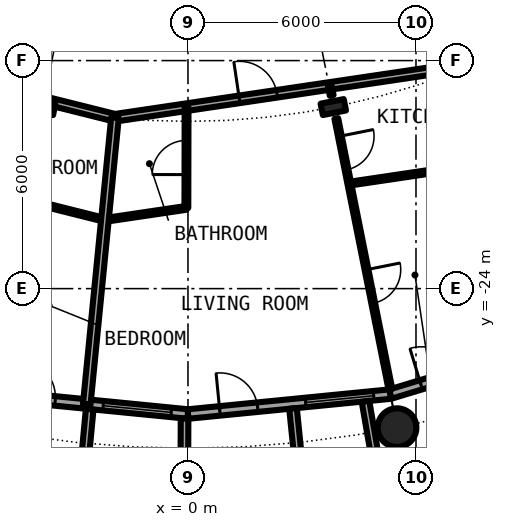
"""IFC4 building model, lengths in metres.
Left out: names, types, materials, properties, quantities, classifications, styles, units other than length and angle.
Written with IfcOpenShell. Run it as: python <this file> out.ifc"""

import sys

from ifc_helpers import new_model, si_unit, direction, frame, frame_2d, origin, origin_2d, place, context, subcontext, project, spatial, rectangle, hollow_circle, i_section, extrude, element, fill, save


model = new_model("IFC4")
c1 = context("Model", 3, precision=1e-05, world=origin(), true_north=direction((0.0, 1.0)))
c2 = subcontext(c1, "Body", "Model", "MODEL_VIEW")
j1 = project(units=[si_unit("LENGTHUNIT", "METRE"), si_unit("PLANEANGLEUNIT", "RADIAN")], contexts=[c1])
p1 = place(None, origin())
s1 = spatial("IfcSite", under=j1, at=p1, CompositionType="ELEMENT")
p2 = place(p1, origin())
s2 = spatial("IfcBuilding", under=s1, at=p2, CompositionType="ELEMENT")
p3 = place(p2, frame((0.0, 0.0, 35.0)))
s3 = spatial("IfcBuildingStorey", under=s2, at=p3, CompositionType="ELEMENT", Elevation=35.0)
p4 = place(p3, frame((5.501, -27.658, 0.0), z_axis=(0.0, 0.0, 1.0), x_axis=(1.0, 0.0, 0.0)))
e1 = element("IfcColumn", 1, at=p4, inside=s3, PredefinedType="COLUMN", context=c2, shape_type="SweptSolid", body=[
    extrude(hollow_circle(Radius=0.508, WallThickness=0.05, at=origin_2d()), origin(), (0.0, 0.0, 1.0), 3.05),
])
for number, where, z_axis, x_axis in (
    (2, (-3.824, -19.223, 0.0), (0.0, 0.0, 1.0), (-0.195, -0.981, 0.0)),
    (3, (3.824, -19.223, 0.0), (0.0, 0.0, 1.0), (0.195, -0.981, 0.0)),
):
    element("IfcColumn", number, at=place(p3, frame(where, z_axis=z_axis, x_axis=x_axis)), inside=s3, PredefinedType="COLUMN", context=c2, shape_type="SweptSolid", body=[
        extrude(i_section(OverallWidth=0.305, OverallDepth=0.62, WebThickness=0.021, FlangeThickness=0.04, FilletRadius=0.027, at=origin_2d()), origin(), (0.0, 0.0, 1.0), 3.05),
    ])
p5 = place(p3, frame((-5.326, -26.775, 0.0), z_axis=(0.0, 0.0, 1.0), x_axis=(0.995173996315, -0.098126026407, 0.0)))
e4 = element("IfcWall", 4, at=p5, inside=s3, PredefinedType="SOLIDWALL", context=c2, shape_type="SweptSolid", body=[
    extrude(rectangle(XDim=5.352, YDim=0.25, at=frame_2d((2.676, 0.0))), origin(), (0.0, 0.0, 1.0), 2.7),
])
p6 = place(p5, frame((0.841, 0.0, 0.0)))
e5 = element("IfcOpeningElement", 5, at=p6, cuts=e4, PredefinedType="OPENING", context=c2, shape_type="SweptSolid", body=[
    extrude(rectangle(XDim=1.0, YDim=2.2, at=frame_2d((0.5, 1.1))), frame((0.0, 0.135, 0.0), z_axis=(0.0, -1.0, 0.0), x_axis=(1.0, 0.0, 0.0)), (0.0, 0.0, 1.0), 0.27),
])
p7 = place(p5, frame((3.111, 0.0, 0.3)))
e6 = element("IfcOpeningElement", 6, at=p7, cuts=e4, PredefinedType="OPENING", context=c2, shape_type="SweptSolid", body=[
    extrude(rectangle(XDim=1.8, YDim=2.1, at=frame_2d((0.9, 1.05))), frame((0.0, 0.135, 0.0), z_axis=(0.0, -1.0, 0.0), x_axis=(1.0, 0.0, 0.0)), (0.0, 0.0, 1.0), 0.27),
])
p8 = place(p3, frame((-2.586, -27.171, -0.03), z_axis=(0.0, 0.0, 1.0), x_axis=(-0.094548432284, -0.995520262954, 0.0)))
e7 = element("IfcWall", 7, at=p8, inside=s3, PredefinedType="SOLIDWALL", context=c2, shape_type="SweptSolid", body=[
    extrude(rectangle(XDim=3.006, YDim=0.2, at=frame_2d((1.503, 0.0))), origin(), (0.0, 0.0, 1.0), 2.73),
])
p9 = place(p3, frame((-0.09, -27.417, -0.03), z_axis=(0.0, 0.0, 1.0), x_axis=(-0.00347308367, -0.999993968827, 0.0)))
e8 = element("IfcWall", 8, at=p9, inside=s3, PredefinedType="SOLIDWALL", context=c2, shape_type="SweptSolid", body=[
    extrude(rectangle(XDim=2.882, YDim=0.2, at=frame_2d((1.441, 0.0))), origin(), (0.0, 0.0, 1.0), 2.73),
])
p10 = place(p3, frame((0.0, -27.3, 0.0), z_axis=(0.0, 0.0, 1.0), x_axis=(0.995173996315, 0.098126026407, 0.0)))
e9 = element("IfcWall", 9, at=p10, inside=s3, PredefinedType="SOLIDWALL", context=c2, shape_type="SweptSolid", body=[
    extrude(rectangle(XDim=5.352, YDim=0.25, at=frame_2d((2.676, 0.0))), origin(), (0.0, 0.0, 1.0), 2.7),
])
p11 = place(p10, frame((0.841, 0.0, 0.0)))
e10 = element("IfcOpeningElement", 10, at=p11, cuts=e9, PredefinedType="OPENING", context=c2, shape_type="SweptSolid", body=[
    extrude(rectangle(XDim=1.0, YDim=2.2, at=frame_2d((0.5, 1.1))), frame((0.0, 0.135, 0.0), z_axis=(0.0, -1.0, 0.0), x_axis=(1.0, 0.0, 0.0)), (0.0, 0.0, 1.0), 0.27),
])
p12 = place(p10, frame((3.111, 0.0, 0.3)))
e11 = element("IfcOpeningElement", 11, at=p12, cuts=e9, PredefinedType="OPENING", context=c2, shape_type="SweptSolid", body=[
    extrude(rectangle(XDim=1.8, YDim=2.1, at=frame_2d((0.9, 1.05))), frame((0.0, 0.135, 0.0), z_axis=(0.0, -1.0, 0.0), x_axis=(1.0, 0.0, 0.0)), (0.0, 0.0, 1.0), 0.27),
])
p13 = place(p3, frame((2.764, -27.153, -0.03), z_axis=(0.0, 0.0, 1.0), x_axis=(0.101505487237, -0.994834979311, 0.0)))
e12 = element("IfcWall", 12, at=p13, inside=s3, PredefinedType="SOLIDWALL", context=c2, shape_type="SweptSolid", body=[
    extrude(rectangle(XDim=3.007, YDim=0.2, at=frame_2d((1.503, 0.0))), origin(), (0.0, 0.0, 1.0), 2.73),
])
p14 = place(p3, frame((4.671, -26.966, -0.03), z_axis=(0.0, 0.0, 1.0), x_axis=(0.170539878907, -0.985350774954, 0.0)))
e13 = element("IfcWall", 13, at=p14, inside=s3, PredefinedType="SOLIDWALL", context=c2, shape_type="SweptSolid", body=[
    extrude(rectangle(XDim=2.932, YDim=0.2, at=frame_2d((1.466, 0.0))), origin(), (0.0, 0.0, 1.0), 2.73),
])
p15 = place(p3, frame((5.326, -26.775, 0.0), z_axis=(0.0, 0.0, 1.0), x_axis=(0.956965678721, 0.290201119486, 0.0)))
e14 = element("IfcWall", 14, at=p15, inside=s3, PredefinedType="SOLIDWALL", context=c2, shape_type="SweptSolid", body=[
    extrude(rectangle(XDim=5.351, YDim=0.25, at=frame_2d((2.676, 0.0))), origin(), (0.0, 0.0, 1.0), 2.7),
])
p16 = place(p15, frame((0.841, 0.0, 0.0)))
e15 = element("IfcOpeningElement", 15, at=p16, cuts=e14, PredefinedType="OPENING", context=c2, shape_type="SweptSolid", body=[
    extrude(rectangle(XDim=1.0, YDim=2.2, at=frame_2d((0.5, 1.1))), frame((0.0, 0.135, 0.0), z_axis=(0.0, -1.0, 0.0), x_axis=(1.0, 0.0, 0.0)), (0.0, 0.0, 1.0), 0.27),
])
p17 = place(p15, frame((3.111, 0.0, 0.3)))
e16 = element("IfcOpeningElement", 16, at=p17, cuts=e14, PredefinedType="OPENING", context=c2, shape_type="SweptSolid", body=[
    extrude(rectangle(XDim=1.8, YDim=2.1, at=frame_2d((0.9, 1.05))), frame((0.0, 0.135, 0.0), z_axis=(0.0, -1.0, 0.0), x_axis=(1.0, 0.0, 0.0)), (0.0, 0.0, 1.0), 0.27),
])
p18 = place(p3, frame((-4.302, -21.663, 0.0), z_axis=(0.0, 0.0, 1.0), x_axis=(0.97003047456, -0.242983288366, 0.0)))
e17 = element("IfcWall", 17, at=p18, inside=s3, PredefinedType="PARTITIONING", context=c2, shape_type="SweptSolid", body=[
    extrude(rectangle(XDim=2.181, YDim=0.1, at=frame_2d((1.091, 0.0))), origin(), (0.0, 0.0, 1.0), 2.7),
])
p19 = place(p3, frame((-2.186, -22.193, 0.0), z_axis=(0.0, 0.0, 1.0), x_axis=(0.989171386505, 0.146765009863, 0.0)))
e18 = element("IfcWall", 18, at=p19, inside=s3, PredefinedType="PARTITIONING", context=c2, shape_type="SweptSolid", body=[
    extrude(rectangle(XDim=2.167, YDim=0.1, at=frame_2d((1.084, 0.0))), origin(), (0.0, 0.0, 1.0), 2.7),
])
p20 = place(p3, frame((4.246, -21.239, 0.0), z_axis=(0.0, 0.0, 1.0), x_axis=(0.989178348771, 0.146718077695, 0.0)))
e19 = element("IfcWall", 19, at=p20, inside=s3, PredefinedType="PARTITIONING", context=c2, shape_type="SweptSolid", body=[
    extrude(rectangle(XDim=4.335, YDim=0.1, at=frame_2d((2.167, 0.0))), origin(), (0.0, 0.0, 1.0), 2.7),
])
p21 = place(p3, frame((-3.639, -19.076, 0.0), z_axis=(0.0, 0.0, 1.0), x_axis=(0.970053237222, -0.242892397895, 0.0)))
e20 = element("IfcWall", 20, at=p21, inside=s3, PredefinedType="PARTITIONING", context=c2, shape_type="SweptSolid", body=[
    extrude(rectangle(XDim=1.771, YDim=0.2, at=frame_2d((0.885, 0.0))), origin(), (0.0, 0.0, 1.0), 2.38),
])
p22 = place(p3, frame((-1.927, -19.506, 0.0), z_axis=(0.0, 0.0, 1.0), x_axis=(0.989181308547, 0.146698121399, 0.0)))
e21 = element("IfcWall", 21, at=p22, inside=s3, PredefinedType="PARTITIONING", context=c2, shape_type="SweptSolid", body=[
    extrude(rectangle(XDim=9.531, YDim=0.2, at=frame_2d((4.766, 0.0))), origin(), (0.0, 0.0, 1.0), 2.38),
])
p23 = place(p22, frame((3.316, 0.0, 0.0)))
e22 = element("IfcOpeningElement", 22, at=p23, cuts=e21, PredefinedType="OPENING", context=c2, shape_type="SweptSolid", body=[
    extrude(rectangle(XDim=1.0, YDim=2.3, at=frame_2d((0.5, 1.15))), frame((0.0, 0.11, 0.0), z_axis=(0.0, -1.0, 0.0), x_axis=(1.0, 0.0, 0.0)), (0.0, 0.0, 1.0), 0.22),
])
p24 = place(p3, frame((-2.664, -27.044, 0.0), z_axis=(0.0, 0.0, 1.0), x_axis=(0.098115395479, 0.995175044487, 0.0)))
e23 = element("IfcWall", 23, at=p24, inside=s3, PredefinedType="PARTITIONING", context=c2, shape_type="SweptSolid", body=[
    extrude(rectangle(XDim=7.574, YDim=0.2, at=frame_2d((3.787, 0.0))), origin(), (0.0, 0.0, 1.0), 2.7),
])
p25 = place(p3, frame((-0.042, -21.875, 0.0), z_axis=(0.0, 0.0, 1.0), x_axis=(0.001843314841, 0.999998301094, 0.0)))
e24 = element("IfcWall", 24, at=p25, inside=s3, PredefinedType="PARTITIONING", context=c2, shape_type="SweptSolid", body=[
    extrude(rectangle(XDim=2.649, YDim=0.1, at=frame_2d((1.324, 0.0))), origin(), (0.0, 0.0, 1.0), 2.7),
])
p26 = place(p25, frame((0.875, 0.0, 0.0)))
e25 = element("IfcOpeningElement", 25, at=p26, cuts=e24, PredefinedType="OPENING", context=c2, shape_type="SweptSolid", body=[
    extrude(rectangle(XDim=0.9, YDim=2.3, at=frame_2d((0.45, 1.15))), frame((0.0, 0.06, 0.0), z_axis=(0.0, -1.0, 0.0), x_axis=(1.0, 0.0, 0.0)), (0.0, 0.0, 1.0), 0.12),
])
p27 = place(p3, frame((3.732, -18.667, 0.0), z_axis=(0.0, 0.0, 1.0), x_axis=(0.197040251839, -0.980395399395, 0.0)))
e26 = element("IfcWall", 26, at=p27, inside=s3, PredefinedType="PARTITIONING", context=c2, shape_type="SweptSolid", body=[
    extrude(rectangle(XDim=0.254, YDim=0.1, at=frame_2d((0.127, 0.0))), origin(), (0.0, 0.0, 1.0), 2.7),
])
p28 = place(p3, frame((3.903, -19.524, 0.0), z_axis=(0.0, 0.0, 1.0), x_axis=(0.195986881771, -0.980606517505, 0.0)))
e27 = element("IfcWall", 27, at=p28, inside=s3, PredefinedType="PARTITIONING", context=c2, shape_type="SweptSolid", body=[
    extrude(rectangle(XDim=7.265, YDim=0.1, at=frame_2d((3.632, 0.0))), origin(), (0.0, 0.0, 1.0), 2.7),
])
p29 = place(p28, frame((0.476, 0.0, 0.0)))
e28 = element("IfcOpeningElement", 28, at=p29, cuts=e27, PredefinedType="OPENING", context=c2, shape_type="SweptSolid", body=[
    extrude(rectangle(XDim=0.9, YDim=2.3, at=frame_2d((0.45, 1.15))), frame((0.0, 0.06, 0.0), z_axis=(0.0, -1.0, 0.0), x_axis=(1.0, 0.0, 0.0)), (0.0, 0.0, 1.0), 0.12),
])
p30 = place(p28, frame((4.057, 0.0, 0.0)))
e29 = element("IfcOpeningElement", 29, at=p30, cuts=e27, PredefinedType="OPENING", context=c2, shape_type="SweptSolid", body=[
    extrude(rectangle(XDim=0.9, YDim=2.3, at=frame_2d((0.45, 1.15))), frame((0.0, 0.06, 0.0), z_axis=(0.0, -1.0, 0.0), x_axis=(1.0, 0.0, 0.0)), (0.0, 0.0, 1.0), 0.12),
])
p31 = place(p6, origin())
e30 = element("IfcDoor", 30, at=p31, inside=s3, OperationType="SINGLE_SWING_LEFT", PredefinedType="DOOR", context=c2, shape_type="SweptSolid", body=[
    extrude(rectangle(XDim=1.0, YDim=2.2, at=frame_2d((0.5, 1.1))), frame((0.0, 0.025, 0.0), z_axis=(0.0, -1.0, 0.0), x_axis=(1.0, 0.0, 0.0)), (0.0, 0.0, 1.0), 0.05),
])
fill(e5, e30)
p32 = place(p7, origin())
e31 = element("IfcWindow", 31, at=p32, inside=s3, PartitioningType="SINGLE_PANEL", PredefinedType="WINDOW", context=c2, shape_type="SweptSolid", body=[
    extrude(rectangle(XDim=1.8, YDim=2.1, at=frame_2d((0.9, 1.05))), frame((0.0, 0.03, 0.0), z_axis=(0.0, -1.0, 0.0), x_axis=(1.0, 0.0, 0.0)), (0.0, 0.0, 1.0), 0.06),
])
fill(e6, e31)
p33 = place(p11, origin())
e32 = element("IfcDoor", 32, at=p33, inside=s3, OperationType="SINGLE_SWING_LEFT", PredefinedType="DOOR", context=c2, shape_type="SweptSolid", body=[
    extrude(rectangle(XDim=1.0, YDim=2.2, at=frame_2d((0.5, 1.1))), frame((0.0, 0.025, 0.0), z_axis=(0.0, -1.0, 0.0), x_axis=(1.0, 0.0, 0.0)), (0.0, 0.0, 1.0), 0.05),
])
fill(e10, e32)
p34 = place(p12, origin())
e33 = element("IfcWindow", 33, at=p34, inside=s3, PartitioningType="SINGLE_PANEL", PredefinedType="WINDOW", context=c2, shape_type="SweptSolid", body=[
    extrude(rectangle(XDim=1.8, YDim=2.1, at=frame_2d((0.9, 1.05))), frame((0.0, 0.03, 0.0), z_axis=(0.0, -1.0, 0.0), x_axis=(1.0, 0.0, 0.0)), (0.0, 0.0, 1.0), 0.06),
])
fill(e11, e33)
p35 = place(p16, origin())
e34 = element("IfcDoor", 34, at=p35, inside=s3, OperationType="SINGLE_SWING_LEFT", PredefinedType="DOOR", context=c2, shape_type="SweptSolid", body=[
    extrude(rectangle(XDim=1.0, YDim=2.2, at=frame_2d((0.5, 1.1))), frame((0.0, 0.025, 0.0), z_axis=(0.0, -1.0, 0.0), x_axis=(1.0, 0.0, 0.0)), (0.0, 0.0, 1.0), 0.05),
])
fill(e15, e34)
p36 = place(p23, origin())
e35 = element("IfcDoor", 35, at=p36, inside=s3, OperationType="SINGLE_SWING_LEFT", PredefinedType="DOOR", context=c2, shape_type="SweptSolid", body=[
    extrude(rectangle(XDim=1.0, YDim=2.3, at=frame_2d((0.5, 1.15))), frame((0.0, 0.025, 0.0), z_axis=(0.0, -1.0, 0.0), x_axis=(1.0, 0.0, 0.0)), (0.0, 0.0, 1.0), 0.05),
])
fill(e22, e35)
p37 = place(p26, origin())
e36 = element("IfcDoor", 36, at=p37, inside=s3, OperationType="SINGLE_SWING_RIGHT", PredefinedType="DOOR", context=c2, shape_type="SweptSolid", body=[
    extrude(rectangle(XDim=0.9, YDim=2.3, at=frame_2d((0.45, 1.15))), frame((0.0, 0.025, 0.0), z_axis=(0.0, -1.0, 0.0), x_axis=(1.0, 0.0, 0.0)), (0.0, 0.0, 1.0), 0.05),
])
fill(e25, e36)
p38 = place(p29, origin())
e37 = element("IfcDoor", 37, at=p38, inside=s3, OperationType="SINGLE_SWING_LEFT", PredefinedType="DOOR", context=c2, shape_type="SweptSolid", body=[
    extrude(rectangle(XDim=0.9, YDim=2.3, at=frame_2d((0.45, 1.15))), frame((0.0, 0.025, 0.0), z_axis=(0.0, -1.0, 0.0), x_axis=(1.0, 0.0, 0.0)), (0.0, 0.0, 1.0), 0.05),
])
fill(e28, e37)
p39 = place(p30, origin())
e38 = element("IfcDoor", 38, at=p39, inside=s3, OperationType="SINGLE_SWING_RIGHT", PredefinedType="DOOR", context=c2, shape_type="SweptSolid", body=[
    extrude(rectangle(XDim=0.9, YDim=2.3, at=frame_2d((0.45, 1.15))), frame((0.0, 0.025, 0.0), z_axis=(0.0, -1.0, 0.0), x_axis=(1.0, 0.0, 0.0)), (0.0, 0.0, 1.0), 0.05),
])
fill(e29, e38)
save(model, sys.argv[1])
